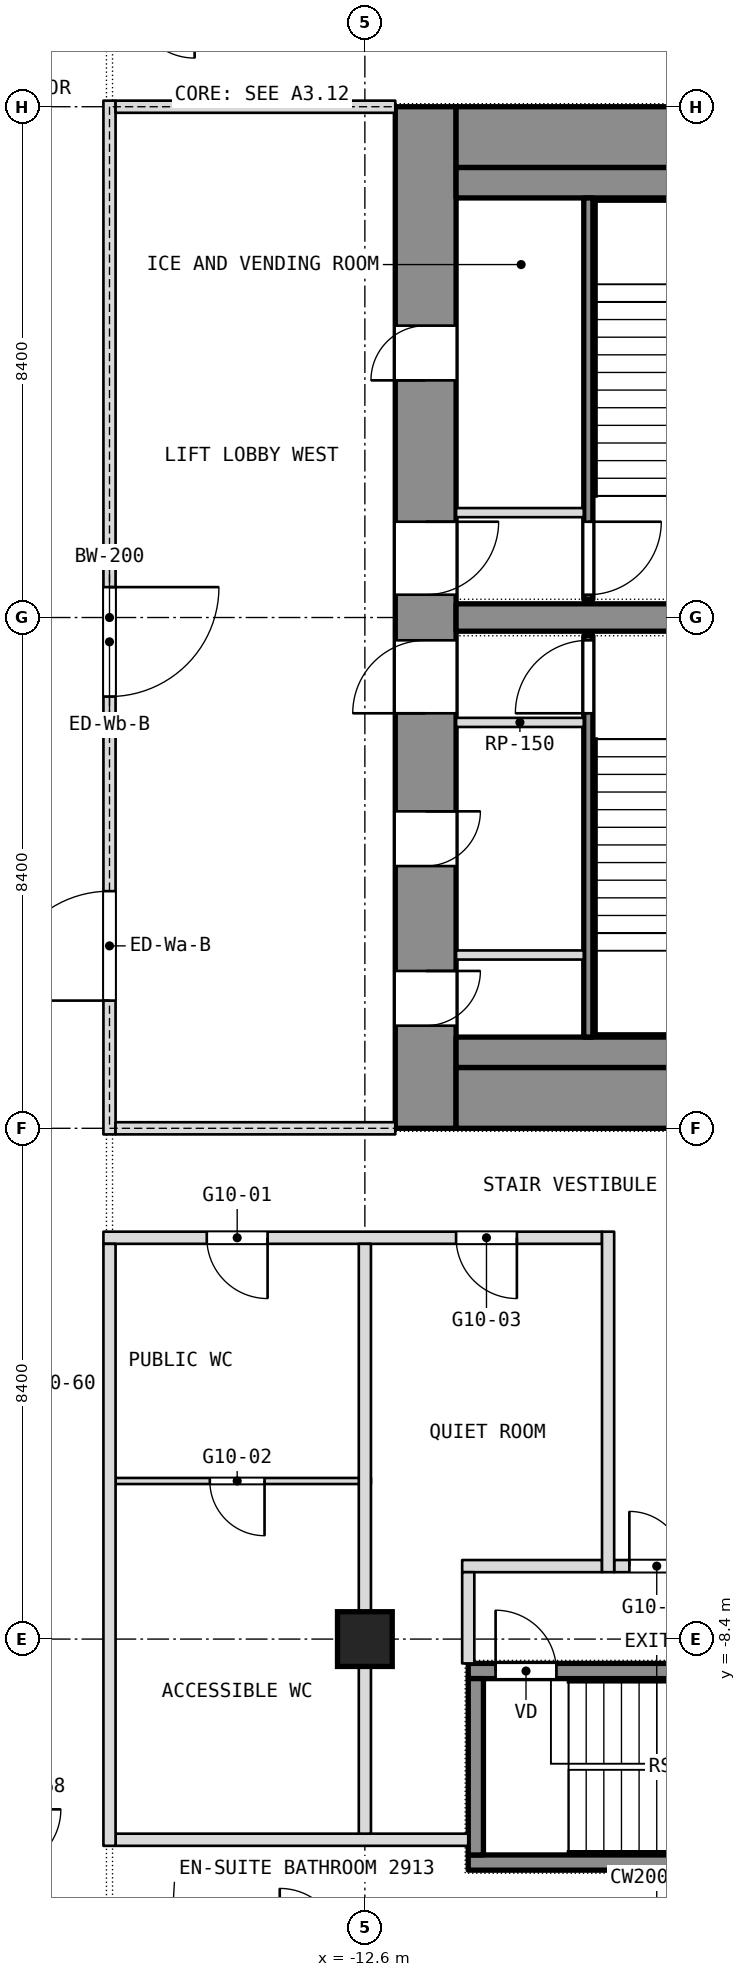
"""IFC4 building model, lengths in metres.
Left out: names, types, materials, properties, quantities, classifications, styles, units other than length and angle.
Written with IfcOpenShell. Run it as: python <this file> out.ifc"""

import sys

from ifc_helpers import new_model, si_unit, direction, frame, frame_2d, origin, origin_2d, place, context, subcontext, project, spatial, rectangle, extrude, element, fill, save


model = new_model("IFC4")
c1 = context("Model", 3, precision=1e-05, world=origin(), true_north=direction((0.0, 1.0)))
c2 = subcontext(c1, "Body", "Model", "MODEL_VIEW")
j1 = project(units=[si_unit("LENGTHUNIT", "METRE"), si_unit("PLANEANGLEUNIT", "RADIAN")], contexts=[c1])
p1 = place(None, origin())
s1 = spatial("IfcSite", under=j1, at=p1, CompositionType="ELEMENT")
p2 = place(p1, origin())
s2 = spatial("IfcBuilding", under=s1, at=p2, CompositionType="ELEMENT")
p3 = place(p2, frame((0.0, 0.0, 130.1)))
s3 = spatial("IfcBuildingStorey", under=s2, at=p3, CompositionType="ELEMENT", Elevation=130.1)
p4 = place(p3, frame((-11.6, 0.0, 0.0), z_axis=(0.0, 0.0, 1.0), x_axis=(0.0, 1.0, 0.0)))
e1 = element("IfcWall", 1, at=p4, inside=s3, PredefinedType="SHEAR", context=c2, shape_type="SweptSolid", body=[
    extrude(rectangle(XDim=16.8, YDim=1.0, at=frame_2d((8.4, 0.0))), origin(), (0.0, 0.0, 1.0), 3.6),
])
p5 = place(p4, frame((1.688, 0.0, 0.0)))
e2 = element("IfcOpeningElement", 2, at=p5, cuts=e1, PredefinedType="OPENING", context=c2, shape_type="SweptSolid", body=[
    extrude(rectangle(XDim=0.9, YDim=2.1, at=frame_2d((0.45, 1.05))), frame((0.0, 0.5, 0.0), z_axis=(0.0, -1.0, 0.0), x_axis=(1.0, 0.0, 0.0)), (0.0, 0.0, 1.0), 1.0),
])
p6 = place(p4, frame((4.312, 0.0, 0.0)))
e3 = element("IfcOpeningElement", 3, at=p6, cuts=e1, PredefinedType="OPENING", context=c2, shape_type="SweptSolid", body=[
    extrude(rectangle(XDim=0.9, YDim=2.1, at=frame_2d((0.45, 1.05))), frame((0.0, 0.5, 0.0), z_axis=(0.0, -1.0, 0.0), x_axis=(1.0, 0.0, 0.0)), (0.0, 0.0, 1.0), 1.0),
])
p7 = place(p4, frame((6.825, 0.0, 0.0)))
e4 = element("IfcOpeningElement", 4, at=p7, cuts=e1, PredefinedType="OPENING", context=c2, shape_type="SweptSolid", body=[
    extrude(rectangle(XDim=1.2, YDim=2.1, at=frame_2d((0.6, 1.05))), frame((0.0, 0.5, 0.0), z_axis=(0.0, -1.0, 0.0), x_axis=(1.0, 0.0, 0.0)), (0.0, 0.0, 1.0), 1.0),
])
p8 = place(p4, frame((12.3, 0.0, 0.0)))
e5 = element("IfcOpeningElement", 5, at=p8, cuts=e1, PredefinedType="OPENING", context=c2, shape_type="SweptSolid", body=[
    extrude(rectangle(XDim=0.9, YDim=2.1, at=frame_2d((0.45, 1.05))), frame((0.0, 0.5, 0.0), z_axis=(0.0, -1.0, 0.0), x_axis=(1.0, 0.0, 0.0)), (0.0, 0.0, 1.0), 1.0),
])
p9 = place(p4, frame((8.775, 0.0, 0.0)))
e6 = element("IfcOpeningElement", 6, at=p9, cuts=e1, PredefinedType="OPENING", context=c2, shape_type="SweptSolid", body=[
    extrude(rectangle(XDim=1.2, YDim=2.1, at=frame_2d((0.6, 1.05))), frame((0.0, 0.5, 0.0), z_axis=(0.0, -1.0, 0.0), x_axis=(1.0, 0.0, 0.0)), (0.0, 0.0, 1.0), 1.0),
])
for number, where, z_axis, x_axis in (
    (7, (-11.1, 0.5, 0.0), (0.0, 0.0, 1.0), (1.0, 0.0, 0.0)),
    (8, (-11.1, 16.3, 0.0), (0.0, 0.0, 1.0), (1.0, 0.0, 0.0)),
):
    element("IfcWall", number, at=place(p3, frame(where, z_axis=z_axis, x_axis=x_axis)), inside=s3, PredefinedType="SHEAR", context=c2, shape_type="SweptSolid", body=[
        extrude(rectangle(XDim=22.2, YDim=1.0, at=frame_2d((11.1, 0.0))), origin(), (0.0, 0.0, 1.0), 3.6),
    ])
p10 = place(p3, frame((-11.1, 8.4, 0.0), z_axis=(0.0, 0.0, 1.0), x_axis=(1.0, 0.0, 0.0)))
e9 = element("IfcWall", 9, at=p10, inside=s3, PredefinedType="SHEAR", context=c2, shape_type="SweptSolid", body=[
    extrude(rectangle(XDim=6.675, YDim=0.45, at=frame_2d((3.337, 0.0))), origin(), (0.0, 0.0, 1.0), 3.6),
])
p11 = place(p3, frame((-12.6, -8.4, 0.0), z_axis=(0.0, 0.0, 1.0), x_axis=(1.0, 0.0, 0.0)))
e10 = element("IfcColumn", 10, at=p11, inside=s3, PredefinedType="COLUMN", context=c2, shape_type="SweptSolid", body=[
    extrude(rectangle(XDim=0.9, YDim=0.9, at=origin_2d()), origin(), (0.0, 0.0, 1.0), 3.6),
])
p12 = place(p3, frame((-16.7, -11.7, 0.0), z_axis=(0.0, 0.0, 1.0), x_axis=(1.0, 0.0, 0.0)))
e11 = element("IfcWall", 11, at=p12, inside=s3, PredefinedType="PARTITIONING", context=c2, shape_type="SweptSolid", body=[
    extrude(rectangle(XDim=5.8, YDim=0.2, at=frame_2d((2.9, 0.0))), origin(), (0.0, 0.0, 1.0), 3.34),
])
p13 = place(p3, frame((-11.0, -7.2, 0.0), z_axis=(0.0, 0.0, 1.0), x_axis=(1.0, 0.0, 0.0)))
e12 = element("IfcWall", 12, at=p13, inside=s3, PredefinedType="PARTITIONING", context=c2, shape_type="SweptSolid", body=[
    extrude(rectangle(XDim=2.3, YDim=0.2, at=frame_2d((1.15, 0.0))), origin(), (0.0, 0.0, 1.0), 3.34),
])
p14 = place(p3, frame((-8.5, -7.2, 0.0), z_axis=(0.0, 0.0, 1.0), x_axis=(1.0, 0.0, 0.0)))
e13 = element("IfcWall", 13, at=p14, inside=s3, PredefinedType="PARTITIONING", context=c2, shape_type="SweptSolid", body=[
    extrude(rectangle(XDim=3.7, YDim=0.2, at=frame_2d((1.85, 0.0))), origin(), (0.0, 0.0, 1.0), 3.34),
])
p15 = place(p14, frame((0.25, 0.0, 0.0)))
e14 = element("IfcOpeningElement", 14, at=p15, cuts=e13, PredefinedType="OPENING", context=c2, shape_type="SweptSolid", body=[
    extrude(rectangle(XDim=0.9, YDim=2.1, at=frame_2d((0.45, 1.05))), frame((0.0, 0.1, 0.0), z_axis=(0.0, -1.0, 0.0), x_axis=(1.0, 0.0, 0.0)), (0.0, 0.0, 1.0), 0.2),
])
p16 = place(p3, frame((-16.7, -5.8, 0.0), z_axis=(0.0, 0.0, 1.0), x_axis=(1.0, 0.0, 0.0)))
e15 = element("IfcWall", 15, at=p16, inside=s3, PredefinedType="PARTITIONING", context=c2, shape_type="SweptSolid", body=[
    extrude(rectangle(XDim=4.2, YDim=0.1, at=frame_2d((2.1, 0.0))), origin(), (0.0, 0.0, 1.0), 3.34),
])
p17 = place(p16, frame((1.55, 0.0, 0.0)))
e16 = element("IfcOpeningElement", 16, at=p17, cuts=e15, PredefinedType="OPENING", context=c2, shape_type="SweptSolid", body=[
    extrude(rectangle(XDim=0.9, YDim=2.1, at=frame_2d((0.45, 1.05))), frame((0.0, 0.05, 0.0), z_axis=(0.0, -1.0, 0.0), x_axis=(1.0, 0.0, 0.0)), (0.0, 0.0, 1.0), 0.1),
])
p18 = place(p3, frame((-16.9, -1.8, 0.0), z_axis=(0.0, 0.0, 1.0), x_axis=(1.0, 0.0, 0.0)))
e17 = element("IfcWall", 17, at=p18, inside=s3, PredefinedType="PARTITIONING", context=c2, shape_type="SweptSolid", body=[
    extrude(rectangle(XDim=8.2, YDim=0.2, at=frame_2d((4.1, 0.0))), origin(), (0.0, 0.0, 1.0), 3.34),
])
p19 = place(p18, frame((1.7, 0.0, 0.0)))
e18 = element("IfcOpeningElement", 18, at=p19, cuts=e17, PredefinedType="OPENING", context=c2, shape_type="SweptSolid", body=[
    extrude(rectangle(XDim=1.0, YDim=2.1, at=frame_2d((0.5, 1.05))), frame((0.0, 0.1, 0.0), z_axis=(0.0, -1.0, 0.0), x_axis=(1.0, 0.0, 0.0)), (0.0, 0.0, 1.0), 0.2),
])
p20 = place(p18, frame((5.8, 0.0, 0.0)))
e19 = element("IfcOpeningElement", 19, at=p20, cuts=e17, PredefinedType="OPENING", context=c2, shape_type="SweptSolid", body=[
    extrude(rectangle(XDim=1.0, YDim=2.1, at=frame_2d((0.5, 1.05))), frame((0.0, 0.1, 0.0), z_axis=(0.0, -1.0, 0.0), x_axis=(1.0, 0.0, 0.0)), (0.0, 0.0, 1.0), 0.2),
])
p21 = place(p3, frame((-8.6, -7.3, 0.0), z_axis=(0.0, 0.0, 1.0), x_axis=(0.0, 1.0, 0.0)))
e20 = element("IfcWall", 20, at=p21, inside=s3, PredefinedType="PARTITIONING", context=c2, shape_type="SweptSolid", body=[
    extrude(rectangle(XDim=5.6, YDim=0.2, at=frame_2d((2.8, 0.0))), origin(), (0.0, 0.0, 1.0), 3.34),
])
p22 = place(p3, frame((-10.9, -8.8, 0.0), z_axis=(0.0, 0.0, 1.0), x_axis=(0.0, 1.0, 0.0)))
e21 = element("IfcWall", 21, at=p22, inside=s3, PredefinedType="PARTITIONING", context=c2, shape_type="SweptSolid", body=[
    extrude(rectangle(XDim=1.5, YDim=0.2, at=frame_2d((0.75, 0.0))), origin(), (0.0, 0.0, 1.0), 3.34),
])
p23 = place(p3, frame((-12.6, -11.6, 0.0), z_axis=(0.0, 0.0, 1.0), x_axis=(0.0, 1.0, 0.0)))
e22 = element("IfcWall", 22, at=p23, inside=s3, PredefinedType="PARTITIONING", context=c2, shape_type="SweptSolid", body=[
    extrude(rectangle(XDim=9.7, YDim=0.2, at=frame_2d((4.85, 0.0))), origin(), (0.0, 0.0, 1.0), 3.34),
])
p24 = place(p3, frame((-16.8, -11.8, 0.0), z_axis=(0.0, 0.0, 1.0), x_axis=(0.0, 1.0, 0.0)))
e23 = element("IfcWall", 23, at=p24, inside=s3, PredefinedType="PARTITIONING", context=c2, shape_type="SweptSolid", body=[
    extrude(rectangle(XDim=9.9, YDim=0.2, at=frame_2d((4.95, 0.0))), origin(), (0.0, 0.0, 1.0), 3.34),
])
for number, where, z_axis, x_axis in (
    (24, (-11.1, 1.25, 0.0), (0.0, 0.0, 1.0), (1.0, 0.0, 0.0)),
    (25, (-11.1, 15.55, 0.0), (0.0, 0.0, 1.0), (1.0, 0.0, 0.0)),
):
    element("IfcWall", number, at=place(p3, frame(where, z_axis=z_axis, x_axis=x_axis)), inside=s3, PredefinedType="PARTITIONING", context=c2, shape_type="SweptSolid", body=[
        extrude(rectangle(XDim=22.2, YDim=0.5, at=frame_2d((11.1, 0.0))), origin(), (0.0, 0.0, 1.0), 3.34),
    ])
p25 = place(p3, frame((-8.925, 1.5, 0.0), z_axis=(0.0, 0.0, 1.0), x_axis=(0.0, 1.0, 0.0)))
e26 = element("IfcWall", 26, at=p25, inside=s3, PredefinedType="SHEAR", context=c2, shape_type="SweptSolid", body=[
    extrude(rectangle(XDim=6.6, YDim=0.15, at=frame_2d((3.3, 0.0))), origin(), (0.0, 0.0, 1.0), 3.34),
])
p26 = place(p25, frame((5.325, 0.0, 0.0)))
e27 = element("IfcOpeningElement", 27, at=p26, cuts=e26, PredefinedType="OPENING", context=c2, shape_type="SweptSolid", body=[
    extrude(rectangle(XDim=1.2, YDim=2.1, at=frame_2d((0.6, 1.05))), frame((0.0, 0.075, 0.0), z_axis=(0.0, -1.0, 0.0), x_axis=(1.0, 0.0, 0.0)), (0.0, 0.0, 1.0), 0.15),
])
for number, where, z_axis, x_axis in (
    (28, (-11.1, 6.675, 0.0), (0.0, 0.0, 1.0), (1.0, 0.0, 0.0)),
    (29, (-11.1, 2.85, 0.0), (0.0, 0.0, 1.0), (1.0, 0.0, 0.0)),
):
    element("IfcWall", number, at=place(p3, frame(where, z_axis=z_axis, x_axis=x_axis)), inside=s3, PredefinedType="PARTITIONING", context=c2, shape_type="SweptSolid", body=[
        extrude(rectangle(XDim=2.1, YDim=0.15, at=frame_2d((1.05, 0.0))), origin(), (0.0, 0.0, 1.0), 3.34),
    ])
p27 = place(p3, frame((-8.925, 8.7, 0.0), z_axis=(0.0, 0.0, 1.0), x_axis=(0.0, 1.0, 0.0)))
e30 = element("IfcWall", 30, at=p27, inside=s3, PredefinedType="SHEAR", context=c2, shape_type="SweptSolid", body=[
    extrude(rectangle(XDim=6.6, YDim=0.15, at=frame_2d((3.3, 0.0))), origin(), (0.0, 0.0, 1.0), 3.34),
])
p28 = place(p27, frame((0.075, 0.0, 0.0)))
e31 = element("IfcOpeningElement", 31, at=p28, cuts=e30, PredefinedType="OPENING", context=c2, shape_type="SweptSolid", body=[
    extrude(rectangle(XDim=1.2, YDim=2.1, at=frame_2d((0.6, 1.05))), frame((0.0, 0.075, 0.0), z_axis=(0.0, -1.0, 0.0), x_axis=(1.0, 0.0, 0.0)), (0.0, 0.0, 1.0), 0.15),
])
p29 = place(p3, frame((-11.1, 10.125, 0.0), z_axis=(0.0, 0.0, 1.0), x_axis=(1.0, 0.0, 0.0)))
e32 = element("IfcWall", 32, at=p29, inside=s3, PredefinedType="PARTITIONING", context=c2, shape_type="SweptSolid", body=[
    extrude(rectangle(XDim=2.1, YDim=0.15, at=frame_2d((1.05, 0.0))), origin(), (0.0, 0.0, 1.0), 3.34),
])
p30 = place(p3, frame((-16.8, -0.1, 0.0), z_axis=(0.0, 0.0, 1.0), x_axis=(0.0, 1.0, 0.0)))
e33 = element("IfcWall", 33, at=p30, inside=s3, PredefinedType="PARTITIONING", context=c2, shape_type="SweptSolid", body=[
    extrude(rectangle(XDim=17.0, YDim=0.2, at=frame_2d((8.5, 0.0))), origin(), (0.0, 0.0, 1.0), 3.34),
])
p31 = place(p30, frame((2.2, 0.0, 0.0)))
e34 = element("IfcOpeningElement", 34, at=p31, cuts=e33, PredefinedType="OPENING", context=c2, shape_type="SweptSolid", body=[
    extrude(rectangle(XDim=1.8, YDim=2.1, at=frame_2d((0.9, 1.05))), frame((0.0, 0.1, 0.0), z_axis=(0.0, -1.0, 0.0), x_axis=(1.0, 0.0, 0.0)), (0.0, 0.0, 1.0), 0.2),
])
p32 = place(p30, frame((7.2, 0.0, 0.0)))
e35 = element("IfcOpeningElement", 35, at=p32, cuts=e33, PredefinedType="OPENING", context=c2, shape_type="SweptSolid", body=[
    extrude(rectangle(XDim=1.8, YDim=2.1, at=frame_2d((0.9, 1.05))), frame((0.0, 0.1, 0.0), z_axis=(0.0, -1.0, 0.0), x_axis=(1.0, 0.0, 0.0)), (0.0, 0.0, 1.0), 0.2),
])
for number, where, z_axis, x_axis in (
    (36, (-16.7, 0.0, 0.0), (0.0, 0.0, 1.0), (1.0, 0.0, 0.0)),
    (37, (-16.7, 16.8, 0.0), (0.0, 0.0, 1.0), (1.0, 0.0, 0.0)),
):
    element("IfcWall", number, at=place(p3, frame(where, z_axis=z_axis, x_axis=x_axis)), inside=s3, PredefinedType="PARTITIONING", context=c2, shape_type="SweptSolid", body=[
        extrude(rectangle(XDim=4.6, YDim=0.2, at=frame_2d((2.3, 0.0))), origin(), (0.0, 0.0, 1.0), 2.89),
    ])
p33 = place(p3, frame((-10.9, -12.075, 0.1), z_axis=(0.0, 0.0, 1.0), x_axis=(1.0, 0.0, 0.0)))
e38 = element("IfcWall", 38, at=p33, inside=s3, PredefinedType="SHEAR", context=c2, shape_type="SweptSolid", body=[
    extrude(rectangle(XDim=6.2, YDim=0.25, at=frame_2d((3.1, 0.0))), origin(), (0.0, 0.0, 1.0), 3.6),
])
p34 = place(p3, frame((-10.9, -8.925, 0.1), z_axis=(0.0, 0.0, 1.0), x_axis=(1.0, 0.0, 0.0)))
e39 = element("IfcWall", 39, at=p34, inside=s3, PredefinedType="SHEAR", context=c2, shape_type="SweptSolid", body=[
    extrude(rectangle(XDim=6.2, YDim=0.25, at=frame_2d((3.1, 0.0))), origin(), (0.0, 0.0, 1.0), 3.6),
])
p35 = place(p34, frame((0.45, 0.0, 0.0)))
e40 = element("IfcOpeningElement", 40, at=p35, cuts=e39, PredefinedType="OPENING", context=c2, shape_type="SweptSolid", body=[
    extrude(rectangle(XDim=1.0, YDim=2.1, at=frame_2d((0.5, 1.05))), frame((0.0, 0.125, 0.0), z_axis=(0.0, -1.0, 0.0), x_axis=(1.0, 0.0, 0.0)), (0.0, 0.0, 1.0), 0.25),
])
p36 = place(p3, frame((-10.775, -11.95, 0.1), z_axis=(0.0, 0.0, 1.0), x_axis=(0.0, 1.0, 0.0)))
e41 = element("IfcWall", 41, at=p36, inside=s3, PredefinedType="SHEAR", context=c2, shape_type="SweptSolid", body=[
    extrude(rectangle(XDim=2.9, YDim=0.25, at=frame_2d((1.45, 0.0))), origin(), (0.0, 0.0, 1.0), 3.6),
])
p37 = place(p15, origin())
e42 = element("IfcDoor", 42, at=p37, inside=s3, OperationType="SINGLE_SWING_RIGHT", PredefinedType="DOOR", context=c2, shape_type="SweptSolid", body=[
    extrude(rectangle(XDim=0.9, YDim=2.1, at=frame_2d((0.45, 1.05))), frame((0.0, 0.025, 0.0), z_axis=(0.0, -1.0, 0.0), x_axis=(1.0, 0.0, 0.0)), (0.0, 0.0, 1.0), 0.05),
])
fill(e14, e42)
p38 = place(p17, origin())
e43 = element("IfcDoor", 43, at=p38, inside=s3, OperationType="SINGLE_SWING_RIGHT", PredefinedType="DOOR", context=c2, shape_type="SweptSolid", body=[
    extrude(rectangle(XDim=0.9, YDim=2.1, at=frame_2d((0.45, 1.05))), frame((0.0, 0.025, 0.0), z_axis=(0.0, -1.0, 0.0), x_axis=(1.0, 0.0, 0.0)), (0.0, 0.0, 1.0), 0.05),
])
fill(e16, e43)
p39 = place(p19, origin())
e44 = element("IfcDoor", 44, at=p39, inside=s3, OperationType="SINGLE_SWING_LEFT", PredefinedType="DOOR", context=c2, shape_type="SweptSolid", body=[
    extrude(rectangle(XDim=1.0, YDim=2.1, at=frame_2d((0.5, 1.05))), frame((0.0, 0.025, 0.0), z_axis=(0.0, -1.0, 0.0), x_axis=(1.0, 0.0, 0.0)), (0.0, 0.0, 1.0), 0.05),
])
fill(e18, e44)
p40 = place(p20, origin())
e45 = element("IfcDoor", 45, at=p40, inside=s3, OperationType="SINGLE_SWING_LEFT", PredefinedType="DOOR", context=c2, shape_type="SweptSolid", body=[
    extrude(rectangle(XDim=1.0, YDim=2.1, at=frame_2d((0.5, 1.05))), frame((0.0, 0.025, 0.0), z_axis=(0.0, -1.0, 0.0), x_axis=(1.0, 0.0, 0.0)), (0.0, 0.0, 1.0), 0.05),
])
fill(e19, e45)
p41 = place(p35, origin())
e46 = element("IfcDoor", 46, at=p41, inside=s3, OperationType="SINGLE_SWING_LEFT", PredefinedType="DOOR", context=c2, shape_type="SweptSolid", body=[
    extrude(rectangle(XDim=1.0, YDim=2.1, at=frame_2d((0.5, 1.05))), frame((0.0, 0.025, 0.0), z_axis=(0.0, -1.0, 0.0), x_axis=(1.0, 0.0, 0.0)), (0.0, 0.0, 1.0), 0.05),
])
fill(e40, e46)
p42 = place(p5, origin())
e47 = element("IfcDoor", 47, at=p42, inside=s3, OperationType="SINGLE_SWING_LEFT", PredefinedType="DOOR", context=c2, shape_type="SweptSolid", body=[
    extrude(rectangle(XDim=0.9, YDim=2.1, at=frame_2d((0.45, 1.05))), frame((0.0, 0.025, 0.0), z_axis=(0.0, -1.0, 0.0), x_axis=(1.0, 0.0, 0.0)), (0.0, 0.0, 1.0), 0.05),
])
fill(e2, e47)
p43 = place(p6, origin())
e48 = element("IfcDoor", 48, at=p43, inside=s3, OperationType="SINGLE_SWING_LEFT", PredefinedType="DOOR", context=c2, shape_type="SweptSolid", body=[
    extrude(rectangle(XDim=0.9, YDim=2.1, at=frame_2d((0.45, 1.05))), frame((0.0, 0.025, 0.0), z_axis=(0.0, -1.0, 0.0), x_axis=(1.0, 0.0, 0.0)), (0.0, 0.0, 1.0), 0.05),
])
fill(e3, e48)
p44 = place(p7, origin())
e49 = element("IfcDoor", 49, at=p44, inside=s3, OperationType="SINGLE_SWING_LEFT", PredefinedType="DOOR", context=c2, shape_type="SweptSolid", body=[
    extrude(rectangle(XDim=1.2, YDim=2.1, at=frame_2d((0.6, 1.05))), frame((0.0, 0.025, 0.0), z_axis=(0.0, -1.0, 0.0), x_axis=(1.0, 0.0, 0.0)), (0.0, 0.0, 1.0), 0.05),
])
fill(e4, e49)
p45 = place(p26, origin())
e50 = element("IfcDoor", 50, at=p45, inside=s3, OperationType="SINGLE_SWING_LEFT", PredefinedType="DOOR", context=c2, shape_type="SweptSolid", body=[
    extrude(rectangle(XDim=1.2, YDim=2.1, at=frame_2d((0.6, 1.05))), frame((0.0, 0.025, 0.0), z_axis=(0.0, -1.0, 0.0), x_axis=(1.0, 0.0, 0.0)), (0.0, 0.0, 1.0), 0.05),
])
fill(e27, e50)
p46 = place(p8, origin())
e51 = element("IfcDoor", 51, at=p46, inside=s3, OperationType="SINGLE_SWING_LEFT", PredefinedType="DOOR", context=c2, shape_type="SweptSolid", body=[
    extrude(rectangle(XDim=0.9, YDim=2.1, at=frame_2d((0.45, 1.05))), frame((0.0, 0.025, 0.0), z_axis=(0.0, -1.0, 0.0), x_axis=(1.0, 0.0, 0.0)), (0.0, 0.0, 1.0), 0.05),
])
fill(e5, e51)
p47 = place(p9, origin())
e52 = element("IfcDoor", 52, at=p47, inside=s3, OperationType="SINGLE_SWING_LEFT", PredefinedType="DOOR", context=c2, shape_type="SweptSolid", body=[
    extrude(rectangle(XDim=1.2, YDim=2.1, at=frame_2d((0.6, 1.05))), frame((0.0, 0.025, 0.0), z_axis=(0.0, -1.0, 0.0), x_axis=(1.0, 0.0, 0.0)), (0.0, 0.0, 1.0), 0.05),
])
fill(e6, e52)
p48 = place(p28, origin())
e53 = element("IfcDoor", 53, at=p48, inside=s3, OperationType="SINGLE_SWING_LEFT", PredefinedType="DOOR", context=c2, shape_type="SweptSolid", body=[
    extrude(rectangle(XDim=1.2, YDim=2.1, at=frame_2d((0.6, 1.05))), frame((0.0, 0.025, 0.0), z_axis=(0.0, -1.0, 0.0), x_axis=(1.0, 0.0, 0.0)), (0.0, 0.0, 1.0), 0.05),
])
fill(e31, e53)
p49 = place(p31, origin())
e54 = element("IfcDoor", 54, at=p49, inside=s3, OperationType="DOUBLE_DOOR_SINGLE_SWING", PredefinedType="DOOR", context=c2, shape_type="SweptSolid", body=[
    extrude(rectangle(XDim=1.8, YDim=2.1, at=frame_2d((0.9, 1.05))), frame((0.0, 0.025, 0.0), z_axis=(0.0, -1.0, 0.0), x_axis=(1.0, 0.0, 0.0)), (0.0, 0.0, 1.0), 0.05),
])
fill(e34, e54)
p50 = place(p32, origin())
e55 = element("IfcDoor", 55, at=p50, inside=s3, OperationType="DOUBLE_DOOR_SINGLE_SWING", PredefinedType="DOOR", context=c2, shape_type="SweptSolid", body=[
    extrude(rectangle(XDim=1.8, YDim=2.1, at=frame_2d((0.9, 1.05))), frame((0.0, 0.025, 0.0), z_axis=(0.0, -1.0, 0.0), x_axis=(1.0, 0.0, 0.0)), (0.0, 0.0, 1.0), 0.05),
])
fill(e35, e55)
save(model, sys.argv[1])
